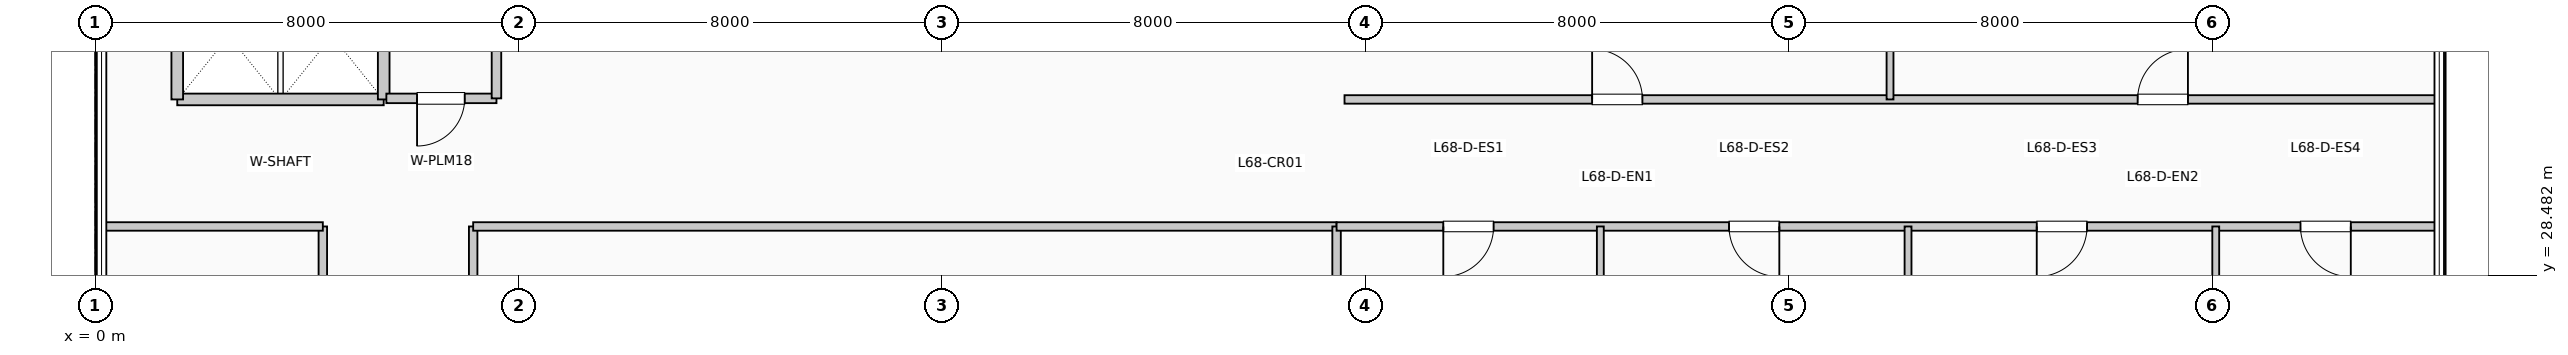
"""IFC4 building model, lengths in metres.
Left out: names, types, materials, properties, quantities, classifications, styles, units other than length and angle.
Written with IfcOpenShell. Run it as: python <this file> out.ifc"""

import sys

from ifc_helpers import new_model, si_unit, direction, frame, frame_2d, origin, place, context, subcontext, project, spatial, rectangle, extrude, element, fill, save


model = new_model("IFC4")
c1 = context("Model", 3, precision=1e-05, world=origin(), true_north=direction((0.0, 1.0)))
c2 = subcontext(c1, "Body", "Model", "MODEL_VIEW")
j1 = project(units=[si_unit("LENGTHUNIT", "METRE"), si_unit("PLANEANGLEUNIT", "RADIAN")], contexts=[c1])
p1 = place(None, origin())
s1 = spatial("IfcSite", under=j1, at=p1, CompositionType="ELEMENT")
p2 = place(p1, origin())
s2 = spatial("IfcBuilding", under=s1, at=p2, CompositionType="ELEMENT")
p3 = place(p2, frame((0.0, 0.0, 280.17)))
s3 = spatial("IfcBuildingStorey", under=s2, at=p3, CompositionType="ELEMENT", Elevation=280.17)
p4 = place(p3, frame((1.55, 31.8, 0.0), z_axis=(0.0, 0.0, 1.0), x_axis=(1.0, 0.0, 0.0)))
e1 = element("IfcWall", 1, at=p4, inside=s3, PredefinedType="PARTITIONING", context=c2, shape_type="SweptSolid", body=[
    extrude(rectangle(XDim=3.9, YDim=0.22, at=frame_2d((1.95, 0.0))), origin(), (0.0, 0.0, 1.0), 3.74),
])
for number, where, z_axis, x_axis in (
    (2, (1.55, 31.8, 0.0), (0.0, 0.0, 1.0), (0.0, 1.0, 0.0)),
    (3, (5.45, 31.8, 0.0), (0.0, 0.0, 1.0), (0.0, 1.0, 0.0)),
):
    element("IfcWall", number, at=place(p3, frame(where, z_axis=z_axis, x_axis=x_axis)), inside=s3, PredefinedType="PARTITIONING", context=c2, shape_type="SweptSolid", body=[
        extrude(rectangle(XDim=2.38, YDim=0.22, at=frame_2d((1.19, 0.0))), origin(), (0.0, 0.0, 1.0), 3.74),
    ])
p5 = place(p3, frame((5.5, 31.82, 0.0), z_axis=(0.0, 0.0, 1.0), x_axis=(1.0, 0.0, 0.0)))
e4 = element("IfcWall", 4, at=p5, inside=s3, PredefinedType="PLUMBINGWALL", context=c2, shape_type="SweptSolid", body=[
    extrude(rectangle(XDim=2.08, YDim=0.18, at=frame_2d((1.04, 0.0))), origin(), (0.0, 0.0, 1.0), 3.74),
])
p6 = place(p5, frame((1.48, 0.0, 0.0), z_axis=(0.0, 0.0, 1.0), x_axis=(-1.0, 0.0, 0.0)))
e5 = element("IfcOpeningElement", 5, at=p6, cuts=e4, PredefinedType="OPENING", context=c2, shape_type="SweptSolid", body=[
    extrude(rectangle(XDim=0.9, YDim=2.1, at=frame_2d((0.45, 1.05))), frame((0.0, 0.1, 0.0), z_axis=(0.0, -1.0, 0.0), x_axis=(1.0, 0.0, 0.0)), (0.0, 0.0, 1.0), 0.2),
])
p7 = place(p3, frame((7.58, 31.82, 0.0), z_axis=(0.0, 0.0, 1.0), x_axis=(0.0, 1.0, 0.0)))
e6 = element("IfcWall", 6, at=p7, inside=s3, PredefinedType="PLUMBINGWALL", context=c2, shape_type="SweptSolid", body=[
    extrude(rectangle(XDim=2.36, YDim=0.18, at=frame_2d((1.18, 0.0))), origin(), (0.0, 0.0, 1.0), 3.74),
])
p8 = place(p3, frame((4.3, 12.8, 0.0), z_axis=(0.0, 0.0, 1.0), x_axis=(0.0, 1.0, 0.0)))
e7 = element("IfcWall", 7, at=p8, inside=s3, PredefinedType="PARTITIONING", context=c2, shape_type="SweptSolid", body=[
    extrude(rectangle(XDim=16.6, YDim=0.16, at=frame_2d((8.3, 0.0))), origin(), (0.0, 0.0, 1.0), 3.74),
])
p9 = place(p8, frame((8.775, 0.0, 0.0), z_axis=(0.0, 0.0, 1.0), x_axis=(-1.0, 0.0, 0.0)))
e8 = element("IfcOpeningElement", 8, at=p9, cuts=e7, PredefinedType="OPENING", context=c2, shape_type="SweptSolid", body=[
    extrude(rectangle(XDim=0.95, YDim=2.15, at=frame_2d((0.475, 1.075))), frame((0.0, 0.09, 0.0), z_axis=(0.0, -1.0, 0.0), x_axis=(1.0, 0.0, 0.0)), (0.0, 0.0, 1.0), 0.18),
])
p10 = place(p3, frame((7.14, 12.8, 0.0), z_axis=(0.0, 0.0, 1.0), x_axis=(0.0, 1.0, 0.0)))
e9 = element("IfcWall", 9, at=p10, inside=s3, PredefinedType="PARTITIONING", context=c2, shape_type="SweptSolid", body=[
    extrude(rectangle(XDim=16.6, YDim=0.16, at=frame_2d((8.3, 0.0))), origin(), (0.0, 0.0, 1.0), 3.74),
])
p11 = place(p10, frame((1.849, 0.0, 0.0)))
e10 = element("IfcOpeningElement", 10, at=p11, cuts=e9, PredefinedType="OPENING", context=c2, shape_type="SweptSolid", body=[
    extrude(rectangle(XDim=0.95, YDim=2.15, at=frame_2d((0.475, 1.075))), frame((0.0, 0.09, 0.0), z_axis=(0.0, -1.0, 0.0), x_axis=(1.0, 0.0, 0.0)), (0.0, 0.0, 1.0), 0.18),
])
p12 = place(p10, frame((6.829, 0.0, 0.0)))
e11 = element("IfcOpeningElement", 11, at=p12, cuts=e9, PredefinedType="OPENING", context=c2, shape_type="SweptSolid", body=[
    extrude(rectangle(XDim=0.95, YDim=2.15, at=frame_2d((0.475, 1.075))), frame((0.0, 0.09, 0.0), z_axis=(0.0, -1.0, 0.0), x_axis=(1.0, 0.0, 0.0)), (0.0, 0.0, 1.0), 0.18),
])
p13 = place(p10, frame((12.805, 0.0, 0.0)))
e12 = element("IfcOpeningElement", 12, at=p13, cuts=e9, PredefinedType="OPENING", context=c2, shape_type="SweptSolid", body=[
    extrude(rectangle(XDim=0.95, YDim=2.15, at=frame_2d((0.475, 1.075))), frame((0.0, 0.09, 0.0), z_axis=(0.0, -1.0, 0.0), x_axis=(1.0, 0.0, 0.0)), (0.0, 0.0, 1.0), 0.18),
])
p14 = place(p3, frame((0.19, 29.4, 0.0), z_axis=(0.0, 0.0, 1.0), x_axis=(1.0, 0.0, 0.0)))
e13 = element("IfcWall", 13, at=p14, inside=s3, PredefinedType="PARTITIONING", context=c2, shape_type="SweptSolid", body=[
    extrude(rectangle(XDim=4.11, YDim=0.16, at=frame_2d((2.055, 0.0))), origin(), (0.0, 0.0, 1.0), 3.425),
])
p15 = place(p3, frame((7.14, 29.4, 0.0), z_axis=(0.0, 0.0, 1.0), x_axis=(1.0, 0.0, 0.0)))
e14 = element("IfcWall", 14, at=p15, inside=s3, PredefinedType="PARTITIONING", context=c2, shape_type="SweptSolid", body=[
    extrude(rectangle(XDim=16.31, YDim=0.16, at=frame_2d((8.155, 0.0))), origin(), (0.0, 0.0, 1.0), 3.425),
])
p16 = place(p3, frame((23.45, 6.84, 0.0), z_axis=(0.0, 0.0, 1.0), x_axis=(0.0, 1.0, 0.0)))
e15 = element("IfcWall", 15, at=p16, inside=s3, PredefinedType="PARTITIONING", context=c2, shape_type="SweptSolid", body=[
    extrude(rectangle(XDim=22.56, YDim=0.16, at=frame_2d((11.28, 0.0))), origin(), (0.0, 0.0, 1.0), 3.175),
])
p17 = place(p3, frame((23.45, 29.4, 0.0), z_axis=(0.0, 0.0, 1.0), x_axis=(1.0, 0.0, 0.0)))
e16 = element("IfcWall", 16, at=p17, inside=s3, PredefinedType="PARTITIONING", context=c2, shape_type="SweptSolid", body=[
    extrude(rectangle(XDim=20.76, YDim=0.16, at=frame_2d((10.38, 0.0))), origin(), (0.0, 0.0, 1.0), 3.425),
])
p18 = place(p17, frame((2.966, 0.0, 0.0), z_axis=(0.0, 0.0, 1.0), x_axis=(-1.0, 0.0, 0.0)))
e17 = element("IfcOpeningElement", 17, at=p18, cuts=e16, PredefinedType="OPENING", context=c2, shape_type="SweptSolid", body=[
    extrude(rectangle(XDim=0.95, YDim=2.15, at=frame_2d((0.475, 1.075))), frame((0.0, 0.09, 0.0), z_axis=(0.0, -1.0, 0.0), x_axis=(1.0, 0.0, 0.0)), (0.0, 0.0, 1.0), 0.18),
])
p19 = place(p17, frame((8.364, 0.0, 0.0), z_axis=(0.0, 0.0, 1.0), x_axis=(-1.0, 0.0, 0.0)))
e18 = element("IfcOpeningElement", 18, at=p19, cuts=e16, PredefinedType="OPENING", context=c2, shape_type="SweptSolid", body=[
    extrude(rectangle(XDim=0.95, YDim=2.15, at=frame_2d((0.475, 1.075))), frame((0.0, 0.09, 0.0), z_axis=(0.0, -1.0, 0.0), x_axis=(1.0, 0.0, 0.0)), (0.0, 0.0, 1.0), 0.18),
])
p20 = place(p17, frame((14.177, 0.0, 0.0), z_axis=(0.0, 0.0, 1.0), x_axis=(-1.0, 0.0, 0.0)))
e19 = element("IfcOpeningElement", 19, at=p20, cuts=e16, PredefinedType="OPENING", context=c2, shape_type="SweptSolid", body=[
    extrude(rectangle(XDim=0.95, YDim=2.15, at=frame_2d((0.475, 1.075))), frame((0.0, 0.09, 0.0), z_axis=(0.0, -1.0, 0.0), x_axis=(1.0, 0.0, 0.0)), (0.0, 0.0, 1.0), 0.18),
])
p21 = place(p17, frame((19.159, 0.0, 0.0), z_axis=(0.0, 0.0, 1.0), x_axis=(-1.0, 0.0, 0.0)))
e20 = element("IfcOpeningElement", 20, at=p21, cuts=e16, PredefinedType="OPENING", context=c2, shape_type="SweptSolid", body=[
    extrude(rectangle(XDim=0.95, YDim=2.15, at=frame_2d((0.475, 1.075))), frame((0.0, 0.09, 0.0), z_axis=(0.0, -1.0, 0.0), x_axis=(1.0, 0.0, 0.0)), (0.0, 0.0, 1.0), 0.18),
])
p22 = place(p3, frame((23.6, 31.8, 0.0), z_axis=(0.0, 0.0, 1.0), x_axis=(1.0, 0.0, 0.0)))
e21 = element("IfcWall", 21, at=p22, inside=s3, PredefinedType="PARTITIONING", context=c2, shape_type="SweptSolid", body=[
    extrude(rectangle(XDim=20.61, YDim=0.16, at=frame_2d((10.305, 0.0))), origin(), (0.0, 0.0, 1.0), 3.74),
])
p23 = place(p22, frame((4.677, 0.0, 0.0)))
e22 = element("IfcOpeningElement", 22, at=p23, cuts=e21, PredefinedType="OPENING", context=c2, shape_type="SweptSolid", body=[
    extrude(rectangle(XDim=0.95, YDim=2.15, at=frame_2d((0.475, 1.075))), frame((0.0, 0.09, 0.0), z_axis=(0.0, -1.0, 0.0), x_axis=(1.0, 0.0, 0.0)), (0.0, 0.0, 1.0), 0.18),
])
p24 = place(p22, frame((14.982, 0.0, 0.0)))
e23 = element("IfcOpeningElement", 23, at=p24, cuts=e21, PredefinedType="OPENING", context=c2, shape_type="SweptSolid", body=[
    extrude(rectangle(XDim=0.95, YDim=2.15, at=frame_2d((0.475, 1.075))), frame((0.0, 0.09, 0.0), z_axis=(0.0, -1.0, 0.0), x_axis=(1.0, 0.0, 0.0)), (0.0, 0.0, 1.0), 0.18),
])
for number, where, z_axis, x_axis in (
    (24, (28.432, 25.19, 0.0), (0.0, 0.0, 1.0), (0.0, 1.0, 0.0)),
    (25, (34.245, 25.19, 0.0), (0.0, 0.0, 1.0), (0.0, 1.0, 0.0)),
):
    element("IfcWall", number, at=place(p3, frame(where, z_axis=z_axis, x_axis=x_axis)), inside=s3, PredefinedType="PARTITIONING", context=c2, shape_type="SweptSolid", body=[
        extrude(rectangle(XDim=4.21, YDim=0.13, at=frame_2d((2.105, 0.0))), origin(), (0.0, 0.0, 1.0), 3.74),
    ])
p25 = place(p3, frame((40.058, 25.19, 0.0), z_axis=(0.0, 0.0, 1.0), x_axis=(0.0, 1.0, 0.0)))
e26 = element("IfcWall", 26, at=p25, inside=s3, PredefinedType="PARTITIONING", context=c2, shape_type="SweptSolid", body=[
    extrude(rectangle(XDim=4.21, YDim=0.13, at=frame_2d((2.105, 0.0))), origin(), (0.0, 0.0, 1.0), 3.175),
])
p26 = place(p3, frame((33.905, 31.8, 0.0), z_axis=(0.0, 0.0, 1.0), x_axis=(0.0, 1.0, 0.0)))
e27 = element("IfcWall", 27, at=p26, inside=s3, PredefinedType="PARTITIONING", context=c2, shape_type="SweptSolid", body=[
    extrude(rectangle(XDim=14.01, YDim=0.13, at=frame_2d((7.005, 0.0))), origin(), (0.0, 0.0, 1.0), 3.74),
])
p27 = place(p6, origin())
e28 = element("IfcDoor", 28, at=p27, inside=s3, OperationType="SINGLE_SWING_LEFT", PredefinedType="DOOR", context=c2, shape_type="SweptSolid", body=[
    extrude(rectangle(XDim=0.9, YDim=2.1, at=frame_2d((0.45, 1.05))), frame((0.0, 0.025, 0.0), z_axis=(0.0, -1.0, 0.0), x_axis=(1.0, 0.0, 0.0)), (0.0, 0.0, 1.0), 0.05),
])
fill(e5, e28)
p28 = place(p18, origin())
e29 = element("IfcDoor", 29, at=p28, inside=s3, OperationType="SINGLE_SWING_LEFT", PredefinedType="DOOR", context=c2, shape_type="SweptSolid", body=[
    extrude(rectangle(XDim=0.95, YDim=2.15, at=frame_2d((0.475, 1.075))), frame((0.0, 0.025, 0.0), z_axis=(0.0, -1.0, 0.0), x_axis=(1.0, 0.0, 0.0)), (0.0, 0.0, 1.0), 0.05),
])
fill(e17, e29)
p29 = place(p19, origin())
e30 = element("IfcDoor", 30, at=p29, inside=s3, OperationType="SINGLE_SWING_RIGHT", PredefinedType="DOOR", context=c2, shape_type="SweptSolid", body=[
    extrude(rectangle(XDim=0.95, YDim=2.15, at=frame_2d((0.475, 1.075))), frame((0.0, 0.025, 0.0), z_axis=(0.0, -1.0, 0.0), x_axis=(1.0, 0.0, 0.0)), (0.0, 0.0, 1.0), 0.05),
])
fill(e18, e30)
p30 = place(p20, origin())
e31 = element("IfcDoor", 31, at=p30, inside=s3, OperationType="SINGLE_SWING_LEFT", PredefinedType="DOOR", context=c2, shape_type="SweptSolid", body=[
    extrude(rectangle(XDim=0.95, YDim=2.15, at=frame_2d((0.475, 1.075))), frame((0.0, 0.025, 0.0), z_axis=(0.0, -1.0, 0.0), x_axis=(1.0, 0.0, 0.0)), (0.0, 0.0, 1.0), 0.05),
])
fill(e19, e31)
p31 = place(p21, origin())
e32 = element("IfcDoor", 32, at=p31, inside=s3, OperationType="SINGLE_SWING_RIGHT", PredefinedType="DOOR", context=c2, shape_type="SweptSolid", body=[
    extrude(rectangle(XDim=0.95, YDim=2.15, at=frame_2d((0.475, 1.075))), frame((0.0, 0.025, 0.0), z_axis=(0.0, -1.0, 0.0), x_axis=(1.0, 0.0, 0.0)), (0.0, 0.0, 1.0), 0.05),
])
fill(e20, e32)
p32 = place(p23, origin())
e33 = element("IfcDoor", 33, at=p32, inside=s3, OperationType="SINGLE_SWING_LEFT", PredefinedType="DOOR", context=c2, shape_type="SweptSolid", body=[
    extrude(rectangle(XDim=0.95, YDim=2.15, at=frame_2d((0.475, 1.075))), frame((0.0, 0.025, 0.0), z_axis=(0.0, -1.0, 0.0), x_axis=(1.0, 0.0, 0.0)), (0.0, 0.0, 1.0), 0.05),
])
fill(e22, e33)
p33 = place(p24, origin())
e34 = element("IfcDoor", 34, at=p33, inside=s3, OperationType="SINGLE_SWING_RIGHT", PredefinedType="DOOR", context=c2, shape_type="SweptSolid", body=[
    extrude(rectangle(XDim=0.95, YDim=2.15, at=frame_2d((0.475, 1.075))), frame((0.0, 0.025, 0.0), z_axis=(0.0, -1.0, 0.0), x_axis=(1.0, 0.0, 0.0)), (0.0, 0.0, 1.0), 0.05),
])
fill(e23, e34)
save(model, sys.argv[1])
